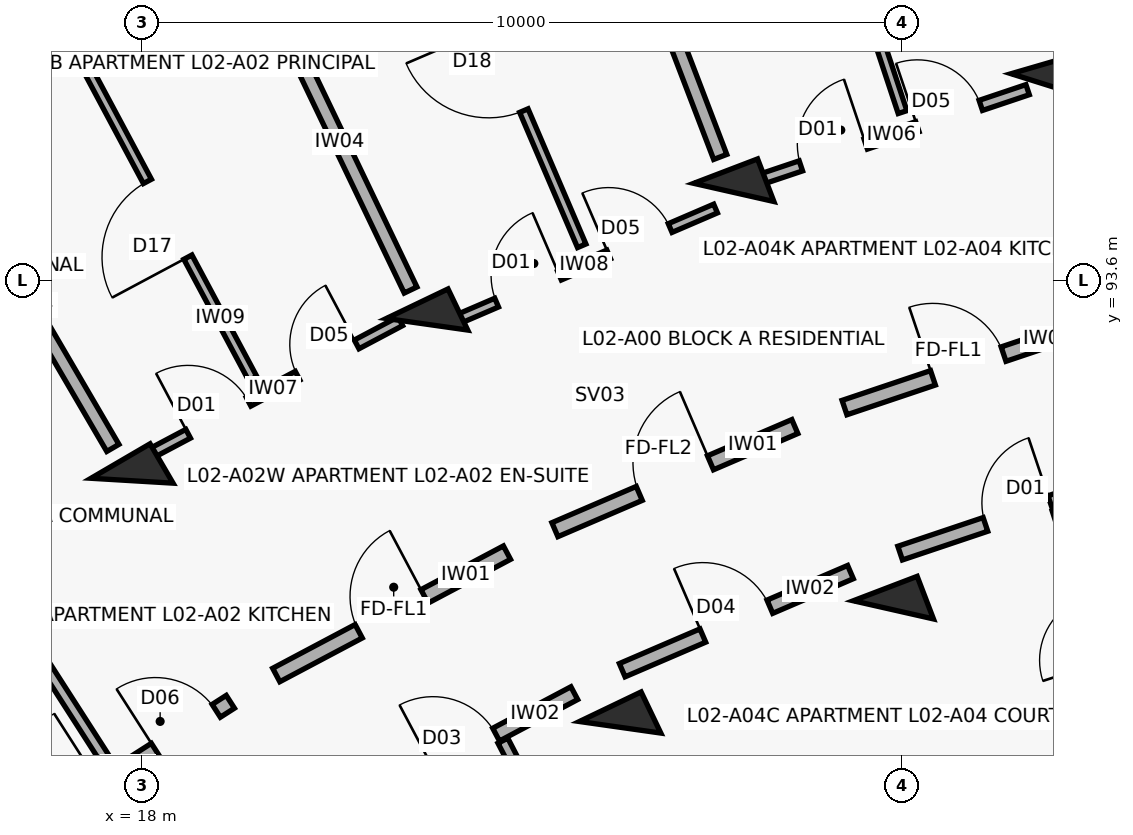
"""IFC4 building model, lengths in metres.
Left out: names, types, materials, properties, quantities, classifications, styles, units other than length and angle.
Written with IfcOpenShell. Run it as: python <this file> out.ifc"""

import sys

from ifc_helpers import new_model, si_unit, direction, frame, frame_2d, origin, origin_2d, place, context, subcontext, project, spatial, rectangle, extrude, element, fill, save


model = new_model("IFC4")
c1 = context("Model", 3, precision=1e-05, world=origin(), true_north=direction((0.0, 1.0)))
c2 = subcontext(c1, "Body", "Model", "MODEL_VIEW")
j1 = project(units=[si_unit("LENGTHUNIT", "METRE"), si_unit("PLANEANGLEUNIT", "RADIAN")], contexts=[c1])
p1 = place(None, origin())
s1 = spatial("IfcSite", under=j1, at=p1, CompositionType="ELEMENT")
p2 = place(p1, origin())
s2 = spatial("IfcBuilding", under=s1, at=p2, CompositionType="ELEMENT")
p3 = place(p2, frame((0.0, 0.0, 8.1)))
s3 = spatial("IfcBuildingStorey", under=s2, at=p3, CompositionType="ELEMENT", Elevation=8.1)
for number, where, z_axis, x_axis in (
    (1, (17.873, 90.96, 0.0), (0.0, 0.0, 1.0), (-0.504, 0.864, 0.0)),
    (2, (24.294, 87.716, 0.0), (0.0, 0.0, 1.0), (-0.432, 0.902, 0.0)),
    (3, (21.754, 93.019, 0.0), (0.0, 0.0, 1.0), (-0.432, 0.902, 0.0)),
    (4, (27.889, 89.261, 0.0), (0.0, 0.0, 1.0), (-0.357, 0.934, 0.0)),
    (5, (25.79, 94.753, 0.0), (0.0, 0.0, 1.0), (-0.357, 0.934, 0.0)),
    (6, (29.954, 96.153, 0.0), (0.0, 0.0, 1.0), (-0.28, 0.96, 0.0)),
):
    element("IfcColumn", number, at=place(p3, frame(where, z_axis=z_axis, x_axis=x_axis)), inside=s3, PredefinedType="COLUMN", context=c2, shape_type="SweptSolid", body=[
        extrude(rectangle(XDim=0.6, YDim=0.9, at=origin_2d()), origin(), (0.0, 0.0, 1.0), 3.1),
    ])
p4 = place(p3, frame((16.272, 86.199, 0.0), z_axis=(0.0, 0.0, 1.0), x_axis=(0.842257205985, 0.539075874963, 0.0)))
e7 = element("IfcWall", 7, at=p4, inside=s3, PredefinedType="SOLIDWALL", context=c2, shape_type="SweptSolid", body=[
    extrude(rectangle(XDim=3.436, YDim=0.2, at=frame_2d((1.718, 0.0))), origin(), (0.0, 0.0, 1.0), 2.08),
])
p5 = place(p4, frame((0.28, 0.0, 0.0)))
e8 = element("IfcOpeningElement", 8, at=p5, cuts=e7, PredefinedType="OPENING", context=c2, shape_type="SweptSolid", body=[
    extrude(rectangle(XDim=1.12, YDim=2.15, at=frame_2d((0.56, 1.075))), frame((0.0, 0.11, 0.0), z_axis=(0.0, -1.0, 0.0), x_axis=(1.0, 0.0, 0.0)), (0.0, 0.0, 1.0), 0.22),
])
p6 = place(p4, frame((2.266, 0.0, 0.0)))
e9 = element("IfcOpeningElement", 9, at=p6, cuts=e7, PredefinedType="OPENING", context=c2, shape_type="SweptSolid", body=[
    extrude(rectangle(XDim=0.95, YDim=2.1, at=frame_2d((0.475, 1.05))), frame((0.0, 0.11, 0.0), z_axis=(0.0, -1.0, 0.0), x_axis=(1.0, 0.0, 0.0)), (0.0, 0.0, 1.0), 0.22),
])
p7 = place(p3, frame((17.524, 87.288, 0.0), z_axis=(0.0, 0.0, 1.0), x_axis=(-0.540338452216, 0.841447774408, 0.0)))
e10 = element("IfcWall", 10, at=p7, inside=s3, PredefinedType="PARTITIONING", context=c2, shape_type="SweptSolid", body=[
    extrude(rectangle(XDim=7.95, YDim=0.14, at=frame_2d((3.975, 0.0))), origin(), (0.0, 0.0, 1.0), 2.08),
])
p8 = place(p7, frame((6.05, 0.0, 0.0)))
e11 = element("IfcOpeningElement", 11, at=p8, cuts=e10, PredefinedType="OPENING", context=c2, shape_type="SweptSolid", body=[
    extrude(rectangle(XDim=0.92, YDim=2.1, at=frame_2d((0.46, 1.05))), frame((0.0, 0.08, 0.0), z_axis=(0.0, -1.0, 0.0), x_axis=(1.0, 0.0, 0.0)), (0.0, 0.0, 1.0), 0.16),
])
p9 = place(p3, frame((19.77, 88.404, 0.0), z_axis=(0.0, 0.0, 1.0), x_axis=(0.883410853063, 0.468599258099, 0.0)))
e12 = element("IfcWall", 12, at=p9, inside=s3, PredefinedType="SOLIDWALL", context=c2, shape_type="SweptSolid", body=[
    extrude(rectangle(XDim=3.436, YDim=0.2, at=frame_2d((1.718, 0.0))), origin(), (0.0, 0.0, 1.0), 2.08),
])
p10 = place(p9, frame((1.228, 0.0, 0.0)))
e13 = element("IfcOpeningElement", 13, at=p10, cuts=e12, PredefinedType="OPENING", context=c2, shape_type="SweptSolid", body=[
    extrude(rectangle(XDim=0.98, YDim=2.15, at=frame_2d((0.49, 1.075))), frame((0.0, 0.11, 0.0), z_axis=(0.0, -1.0, 0.0), x_axis=(1.0, 0.0, 0.0)), (0.0, 0.0, 1.0), 0.22),
])
p11 = place(p3, frame((20.804, 86.634, 0.0), z_axis=(0.0, 0.0, 1.0), x_axis=(0.883444301944, 0.468536194293, 0.0)))
e14 = element("IfcWall", 14, at=p11, inside=s3, PredefinedType="SOLIDWALL", context=c2, shape_type="SweptSolid", body=[
    extrude(rectangle(XDim=3.269, YDim=0.19, at=frame_2d((1.634, 0.0))), origin(), (0.0, 0.0, 1.0), 2.08),
])
p12 = place(p11, frame((1.164, 0.0, 0.0)))
e15 = element("IfcOpeningElement", 15, at=p12, cuts=e14, PredefinedType="OPENING", context=c2, shape_type="SweptSolid", body=[
    extrude(rectangle(XDim=0.94, YDim=2.1, at=frame_2d((0.47, 1.05))), frame((0.0, 0.105, 0.0), z_axis=(0.0, -1.0, 0.0), x_axis=(1.0, 0.0, 0.0)), (0.0, 0.0, 1.0), 0.21),
])
p13 = place(p3, frame((24.267, 84.608, 0.0), z_axis=(0.0, 0.0, 1.0), x_axis=(-0.459217611894, 0.888323806349, 0.0)))
e16 = element("IfcWall", 16, at=p13, inside=s3, PredefinedType="PARTITIONING", context=c2, shape_type="SweptSolid", body=[
    extrude(rectangle(XDim=3.3, YDim=0.145, at=frame_2d((1.65, 0.0))), origin(), (0.0, 0.0, 1.0), 2.08),
])
p14 = place(p13, frame((1.21, 0.0, 0.0)))
e17 = element("IfcOpeningElement", 17, at=p14, cuts=e16, PredefinedType="OPENING", context=c2, shape_type="SweptSolid", body=[
    extrude(rectangle(XDim=0.88, YDim=2.1, at=frame_2d((0.44, 1.05))), frame((0.0, 0.083, 0.0), z_axis=(0.0, -1.0, 0.0), x_axis=(1.0, 0.0, 0.0)), (0.0, 0.0, 1.0), 0.165),
])
p15 = place(p3, frame((18.037, 91.273, 0.0), z_axis=(0.0, 0.0, 1.0), x_axis=(0.883441603894, 0.468541281543, 0.0)))
e18 = element("IfcWall", 18, at=p15, inside=s3, PredefinedType="PARTITIONING", context=c2, shape_type="SweptSolid", body=[
    extrude(rectangle(XDim=3.81, YDim=0.13, at=frame_2d((1.905, 0.0))), origin(), (0.0, 0.0, 1.0), 2.08),
])
p16 = place(p15, frame((0.65, 0.0, 0.0)))
e19 = element("IfcOpeningElement", 19, at=p16, cuts=e18, PredefinedType="OPENING", context=c2, shape_type="SweptSolid", body=[
    extrude(rectangle(XDim=0.9, YDim=2.1, at=frame_2d((0.45, 1.05))), frame((0.0, 0.075, 0.0), z_axis=(0.0, -1.0, 0.0), x_axis=(1.0, 0.0, 0.0)), (0.0, 0.0, 1.0), 0.15),
])
p17 = place(p15, frame((2.28, 0.0, 0.0)))
e20 = element("IfcOpeningElement", 20, at=p17, cuts=e18, PredefinedType="OPENING", context=c2, shape_type="SweptSolid", body=[
    extrude(rectangle(XDim=0.88, YDim=2.1, at=frame_2d((0.44, 1.05))), frame((0.0, 0.075, 0.0), z_axis=(0.0, -1.0, 0.0), x_axis=(1.0, 0.0, 0.0)), (0.0, 0.0, 1.0), 0.15),
])
p18 = place(p3, frame((19.46, 92.306, 0.0), z_axis=(0.0, 0.0, 1.0), x_axis=(-0.471228378949, 0.88201123285, 0.0)))
e21 = element("IfcWall", 21, at=p18, inside=s3, PredefinedType="PARTITIONING", context=c2, shape_type="SweptSolid", body=[
    extrude(rectangle(XDim=4.75, YDim=0.12, at=frame_2d((2.375, 0.0))), origin(), (0.0, 0.0, 1.0), 2.08),
])
p19 = place(p18, frame((1.81, 0.0, 0.0)))
e22 = element("IfcOpeningElement", 22, at=p19, cuts=e21, PredefinedType="OPENING", context=c2, shape_type="SweptSolid", body=[
    extrude(rectangle(XDim=1.13, YDim=2.1, at=frame_2d((0.565, 1.05))), frame((0.0, 0.07, 0.0), z_axis=(0.0, -1.0, 0.0), x_axis=(1.0, 0.0, 0.0)), (0.0, 0.0, 1.0), 0.14),
])
p20 = place(p3, frame((17.621, 91.392, 0.0), z_axis=(0.0, 0.0, 1.0), x_axis=(-0.504216452091, 0.863577309475, 0.0)))
e23 = element("IfcWall", 23, at=p20, inside=s3, PredefinedType="SOLIDWALL", context=c2, shape_type="SweptSolid", body=[
    extrude(rectangle(XDim=4.35, YDim=0.185, at=frame_2d((2.175, 0.0))), origin(), (0.0, 0.0, 1.0), 2.08),
])
p21 = place(p3, frame((23.437, 90.316, 0.0), z_axis=(0.0, 0.0, 1.0), x_axis=(0.918718172399, 0.394913813008, 0.0)))
e24 = element("IfcWall", 24, at=p21, inside=s3, PredefinedType="SOLIDWALL", context=c2, shape_type="SweptSolid", body=[
    extrude(rectangle(XDim=3.436, YDim=0.2, at=frame_2d((1.718, 0.0))), origin(), (0.0, 0.0, 1.0), 2.08),
])
p22 = place(p21, frame((1.208, 0.0, 0.0)))
e25 = element("IfcOpeningElement", 25, at=p22, cuts=e24, PredefinedType="OPENING", context=c2, shape_type="SweptSolid", body=[
    extrude(rectangle(XDim=1.02, YDim=2.15, at=frame_2d((0.51, 1.075))), frame((0.0, 0.11, 0.0), z_axis=(0.0, -1.0, 0.0), x_axis=(1.0, 0.0, 0.0)), (0.0, 0.0, 1.0), 0.22),
])
p23 = place(p3, frame((24.322, 88.467, 0.0), z_axis=(0.0, 0.0, 1.0), x_axis=(0.918723391052, 0.394901672235, 0.0)))
e26 = element("IfcWall", 26, at=p23, inside=s3, PredefinedType="SOLIDWALL", context=c2, shape_type="SweptSolid", body=[
    extrude(rectangle(XDim=3.269, YDim=0.19, at=frame_2d((1.634, 0.0))), origin(), (0.0, 0.0, 1.0), 2.08),
])
p24 = place(p23, frame((1.154, 0.0, 0.0)))
e27 = element("IfcOpeningElement", 27, at=p24, cuts=e26, PredefinedType="OPENING", context=c2, shape_type="SweptSolid", body=[
    extrude(rectangle(XDim=0.96, YDim=2.1, at=frame_2d((0.48, 1.05))), frame((0.0, 0.105, 0.0), z_axis=(0.0, -1.0, 0.0), x_axis=(1.0, 0.0, 0.0)), (0.0, 0.0, 1.0), 0.21),
])
p25 = place(p3, frame((22.073, 93.047, 0.0), z_axis=(0.0, 0.0, 1.0), x_axis=(0.918737522346, 0.394868794707, 0.0)))
e28 = element("IfcWall", 28, at=p25, inside=s3, PredefinedType="PARTITIONING", context=c2, shape_type="SweptSolid", body=[
    extrude(rectangle(XDim=3.785, YDim=0.125, at=frame_2d((1.893, 0.0))), origin(), (0.0, 0.0, 1.0), 2.08),
])
p26 = place(p25, frame((0.65, 0.0, 0.0)))
e29 = element("IfcOpeningElement", 29, at=p26, cuts=e28, PredefinedType="OPENING", context=c2, shape_type="SweptSolid", body=[
    extrude(rectangle(XDim=0.9, YDim=2.1, at=frame_2d((0.45, 1.05))), frame((0.0, 0.073, 0.0), z_axis=(0.0, -1.0, 0.0), x_axis=(1.0, 0.0, 0.0)), (0.0, 0.0, 1.0), 0.145),
])
p27 = place(p25, frame((2.255, 0.0, 0.0)))
e30 = element("IfcOpeningElement", 30, at=p27, cuts=e28, PredefinedType="OPENING", context=c2, shape_type="SweptSolid", body=[
    extrude(rectangle(XDim=0.88, YDim=2.1, at=frame_2d((0.44, 1.05))), frame((0.0, 0.073, 0.0), z_axis=(0.0, -1.0, 0.0), x_axis=(1.0, 0.0, 0.0)), (0.0, 0.0, 1.0), 0.145),
])
p28 = place(p3, frame((23.789, 94.051, 0.0), z_axis=(0.0, 0.0, 1.0), x_axis=(-0.393539995583, 0.919307495823, 0.0)))
e31 = element("IfcWall", 31, at=p28, inside=s3, PredefinedType="PARTITIONING", context=c2, shape_type="SweptSolid", body=[
    extrude(rectangle(XDim=5.05, YDim=0.12, at=frame_2d((2.525, 0.0))), origin(), (0.0, 0.0, 1.0), 2.08),
])
p29 = place(p28, frame((1.935, 0.0, 0.0)))
e32 = element("IfcOpeningElement", 32, at=p29, cuts=e31, PredefinedType="OPENING", context=c2, shape_type="SweptSolid", body=[
    extrude(rectangle(XDim=1.18, YDim=2.1, at=frame_2d((0.59, 1.05))), frame((0.0, 0.07, 0.0), z_axis=(0.0, -1.0, 0.0), x_axis=(1.0, 0.0, 0.0)), (0.0, 0.0, 1.0), 0.14),
])
p30 = place(p3, frame((21.538, 93.469, 0.0), z_axis=(0.0, 0.0, 1.0), x_axis=(-0.432086898897, 0.901831975371, 0.0)))
e33 = element("IfcWall", 33, at=p30, inside=s3, PredefinedType="SOLIDWALL", context=c2, shape_type="SweptSolid", body=[
    extrude(rectangle(XDim=4.35, YDim=0.185, at=frame_2d((2.175, 0.0))), origin(), (0.0, 0.0, 1.0), 2.08),
])
p31 = place(p3, frame((27.247, 91.923, 0.0), z_axis=(0.0, 0.0, 1.0), x_axis=(0.947863007629, 0.318678080151, 0.0)))
e34 = element("IfcWall", 34, at=p31, inside=s3, PredefinedType="SOLIDWALL", context=c2, shape_type="SweptSolid", body=[
    extrude(rectangle(XDim=3.436, YDim=0.2, at=frame_2d((1.718, 0.0))), origin(), (0.0, 0.0, 1.0), 2.08),
])
p32 = place(p31, frame((1.228, 0.0, 0.0)))
e35 = element("IfcOpeningElement", 35, at=p32, cuts=e34, PredefinedType="OPENING", context=c2, shape_type="SweptSolid", body=[
    extrude(rectangle(XDim=0.98, YDim=2.15, at=frame_2d((0.49, 1.075))), frame((0.0, 0.11, 0.0), z_axis=(0.0, -1.0, 0.0), x_axis=(1.0, 0.0, 0.0)), (0.0, 0.0, 1.0), 0.22),
])
p33 = place(p3, frame((27.979, 90.008, 0.0), z_axis=(0.0, 0.0, 1.0), x_axis=(0.94787351033, 0.318646839643, 0.0)))
e36 = element("IfcWall", 36, at=p33, inside=s3, PredefinedType="SOLIDWALL", context=c2, shape_type="SweptSolid", body=[
    extrude(rectangle(XDim=3.269, YDim=0.19, at=frame_2d((1.634, 0.0))), origin(), (0.0, 0.0, 1.0), 2.08),
])
p34 = place(p33, frame((1.184, 0.0, 0.0)))
e37 = element("IfcOpeningElement", 37, at=p34, cuts=e36, PredefinedType="OPENING", context=c2, shape_type="SweptSolid", body=[
    extrude(rectangle(XDim=0.9, YDim=2.1, at=frame_2d((0.45, 1.05))), frame((0.0, 0.105, 0.0), z_axis=(0.0, -1.0, 0.0), x_axis=(1.0, 0.0, 0.0)), (0.0, 0.0, 1.0), 0.21),
])
p35 = place(p3, frame((31.066, 87.446, 0.0), z_axis=(0.0, 0.0, 1.0), x_axis=(-0.308582493915, 0.951197584337, 0.0)))
e38 = element("IfcWall", 38, at=p35, inside=s3, PredefinedType="PARTITIONING", context=c2, shape_type="SweptSolid", body=[
    extrude(rectangle(XDim=3.3, YDim=0.145, at=frame_2d((1.65, 0.0))), origin(), (0.0, 0.0, 1.0), 2.08),
])
p36 = place(p35, frame((1.21, 0.0, 0.0)))
e39 = element("IfcOpeningElement", 39, at=p36, cuts=e38, PredefinedType="OPENING", context=c2, shape_type="SweptSolid", body=[
    extrude(rectangle(XDim=0.88, YDim=2.1, at=frame_2d((0.44, 1.05))), frame((0.0, 0.083, 0.0), z_axis=(0.0, -1.0, 0.0), x_axis=(1.0, 0.0, 0.0)), (0.0, 0.0, 1.0), 0.165),
])
p37 = place(p3, frame((26.056, 94.896, 0.0), z_axis=(0.0, 0.0, 1.0), x_axis=(0.947876567739, 0.318637744673, 0.0)))
e40 = element("IfcWall", 40, at=p37, inside=s3, PredefinedType="PARTITIONING", context=c2, shape_type="SweptSolid", body=[
    extrude(rectangle(XDim=3.797, YDim=0.14, at=frame_2d((1.899, 0.0))), origin(), (0.0, 0.0, 1.0), 2.08),
])
p38 = place(p37, frame((0.65, 0.0, 0.0)))
e41 = element("IfcOpeningElement", 41, at=p38, cuts=e40, PredefinedType="OPENING", context=c2, shape_type="SweptSolid", body=[
    extrude(rectangle(XDim=0.9, YDim=2.1, at=frame_2d((0.45, 1.05))), frame((0.0, 0.08, 0.0), z_axis=(0.0, -1.0, 0.0), x_axis=(1.0, 0.0, 0.0)), (0.0, 0.0, 1.0), 0.16),
])
p39 = place(p37, frame((2.267, 0.0, 0.0)))
e42 = element("IfcOpeningElement", 42, at=p39, cuts=e40, PredefinedType="OPENING", context=c2, shape_type="SweptSolid", body=[
    extrude(rectangle(XDim=0.88, YDim=2.1, at=frame_2d((0.44, 1.05))), frame((0.0, 0.08, 0.0), z_axis=(0.0, -1.0, 0.0), x_axis=(1.0, 0.0, 0.0)), (0.0, 0.0, 1.0), 0.16),
])
p40 = place(p3, frame((28.01, 95.81, 0.0), z_axis=(0.0, 0.0, 1.0), x_axis=(-0.314343770763, 0.949309219266, 0.0)))
e43 = element("IfcWall", 43, at=p40, inside=s3, PredefinedType="PARTITIONING", context=c2, shape_type="SweptSolid", body=[
    extrude(rectangle(XDim=4.9, YDim=0.12, at=frame_2d((2.45, 0.0))), origin(), (0.0, 0.0, 1.0), 2.08),
])
p41 = place(p40, frame((1.83, 0.0, 0.0)))
e44 = element("IfcOpeningElement", 44, at=p41, cuts=e43, PredefinedType="OPENING", context=c2, shape_type="SweptSolid", body=[
    extrude(rectangle(XDim=1.24, YDim=2.1, at=frame_2d((0.62, 1.05))), frame((0.0, 0.07, 0.0), z_axis=(0.0, -1.0, 0.0), x_axis=(1.0, 0.0, 0.0)), (0.0, 0.0, 1.0), 0.14),
])
p42 = place(p3, frame((25.611, 95.22, 0.0), z_axis=(0.0, 0.0, 1.0), x_axis=(-0.357064016205, 0.934079915388, 0.0)))
e45 = element("IfcWall", 45, at=p42, inside=s3, PredefinedType="SOLIDWALL", context=c2, shape_type="SweptSolid", body=[
    extrude(rectangle(XDim=4.35, YDim=0.185, at=frame_2d((2.175, 0.0))), origin(), (0.0, 0.0, 1.0), 2.08),
])
p43 = place(p6, origin())
e46 = element("IfcDoor", 46, at=p43, inside=s3, OperationType="SINGLE_SWING_LEFT", PredefinedType="DOOR", context=c2, shape_type="SweptSolid", body=[
    extrude(rectangle(XDim=0.95, YDim=2.1, at=frame_2d((0.475, 1.05))), frame((0.0, 0.025, 0.0), z_axis=(0.0, -1.0, 0.0), x_axis=(1.0, 0.0, 0.0)), (0.0, 0.0, 1.0), 0.05),
])
fill(e9, e46)
p44 = place(p10, origin())
e47 = element("IfcDoor", 47, at=p44, inside=s3, OperationType="SINGLE_SWING_RIGHT", PredefinedType="DOOR", context=c2, shape_type="SweptSolid", body=[
    extrude(rectangle(XDim=0.98, YDim=2.15, at=frame_2d((0.49, 1.075))), frame((0.0, 0.025, 0.0), z_axis=(0.0, -1.0, 0.0), x_axis=(1.0, 0.0, 0.0)), (0.0, 0.0, 1.0), 0.05),
])
fill(e13, e47)
p45 = place(p12, origin())
e48 = element("IfcDoor", 48, at=p45, inside=s3, OperationType="SINGLE_SWING_LEFT", PredefinedType="DOOR", context=c2, shape_type="SweptSolid", body=[
    extrude(rectangle(XDim=0.94, YDim=2.1, at=frame_2d((0.47, 1.05))), frame((0.0, 0.025, 0.0), z_axis=(0.0, -1.0, 0.0), x_axis=(1.0, 0.0, 0.0)), (0.0, 0.0, 1.0), 0.05),
])
fill(e15, e48)
p46 = place(p16, origin())
e49 = element("IfcDoor", 49, at=p46, inside=s3, OperationType="SINGLE_SWING_LEFT", PredefinedType="DOOR", context=c2, shape_type="SweptSolid", body=[
    extrude(rectangle(XDim=0.9, YDim=2.1, at=frame_2d((0.45, 1.05))), frame((0.0, 0.025, 0.0), z_axis=(0.0, -1.0, 0.0), x_axis=(1.0, 0.0, 0.0)), (0.0, 0.0, 1.0), 0.05),
])
fill(e19, e49)
p47 = place(p17, origin())
e50 = element("IfcDoor", 50, at=p47, inside=s3, OperationType="SINGLE_SWING_RIGHT", PredefinedType="DOOR", context=c2, shape_type="SweptSolid", body=[
    extrude(rectangle(XDim=0.88, YDim=2.1, at=frame_2d((0.44, 1.05))), frame((0.0, 0.025, 0.0), z_axis=(0.0, -1.0, 0.0), x_axis=(1.0, 0.0, 0.0)), (0.0, 0.0, 1.0), 0.05),
])
fill(e20, e50)
p48 = place(p19, origin())
e51 = element("IfcDoor", 51, at=p48, inside=s3, OperationType="SINGLE_SWING_LEFT", PredefinedType="DOOR", context=c2, shape_type="SweptSolid", body=[
    extrude(rectangle(XDim=1.13, YDim=2.1, at=frame_2d((0.565, 1.05))), frame((0.0, 0.025, 0.0), z_axis=(0.0, -1.0, 0.0), x_axis=(1.0, 0.0, 0.0)), (0.0, 0.0, 1.0), 0.05),
])
fill(e22, e51)
p49 = place(p22, origin())
e52 = element("IfcDoor", 52, at=p49, inside=s3, OperationType="SINGLE_SWING_RIGHT", PredefinedType="DOOR", context=c2, shape_type="SweptSolid", body=[
    extrude(rectangle(XDim=1.02, YDim=2.15, at=frame_2d((0.51, 1.075))), frame((0.0, 0.025, 0.0), z_axis=(0.0, -1.0, 0.0), x_axis=(1.0, 0.0, 0.0)), (0.0, 0.0, 1.0), 0.05),
])
fill(e25, e52)
p50 = place(p24, origin())
e53 = element("IfcDoor", 53, at=p50, inside=s3, OperationType="SINGLE_SWING_LEFT", PredefinedType="DOOR", context=c2, shape_type="SweptSolid", body=[
    extrude(rectangle(XDim=0.96, YDim=2.1, at=frame_2d((0.48, 1.05))), frame((0.0, 0.025, 0.0), z_axis=(0.0, -1.0, 0.0), x_axis=(1.0, 0.0, 0.0)), (0.0, 0.0, 1.0), 0.05),
])
fill(e27, e53)
p51 = place(p26, origin())
e54 = element("IfcDoor", 54, at=p51, inside=s3, OperationType="SINGLE_SWING_RIGHT", PredefinedType="DOOR", context=c2, shape_type="SweptSolid", body=[
    extrude(rectangle(XDim=0.9, YDim=2.1, at=frame_2d((0.45, 1.05))), frame((0.0, 0.025, 0.0), z_axis=(0.0, -1.0, 0.0), x_axis=(1.0, 0.0, 0.0)), (0.0, 0.0, 1.0), 0.05),
])
fill(e29, e54)
p52 = place(p27, origin())
e55 = element("IfcDoor", 55, at=p52, inside=s3, OperationType="SINGLE_SWING_LEFT", PredefinedType="DOOR", context=c2, shape_type="SweptSolid", body=[
    extrude(rectangle(XDim=0.88, YDim=2.1, at=frame_2d((0.44, 1.05))), frame((0.0, 0.025, 0.0), z_axis=(0.0, -1.0, 0.0), x_axis=(1.0, 0.0, 0.0)), (0.0, 0.0, 1.0), 0.05),
])
fill(e30, e55)
p53 = place(p29, origin())
e56 = element("IfcDoor", 56, at=p53, inside=s3, OperationType="SINGLE_SWING_RIGHT", PredefinedType="DOOR", context=c2, shape_type="SweptSolid", body=[
    extrude(rectangle(XDim=1.18, YDim=2.1, at=frame_2d((0.59, 1.05))), frame((0.0, 0.025, 0.0), z_axis=(0.0, -1.0, 0.0), x_axis=(1.0, 0.0, 0.0)), (0.0, 0.0, 1.0), 0.05),
])
fill(e32, e56)
p54 = place(p32, origin())
e57 = element("IfcDoor", 57, at=p54, inside=s3, OperationType="SINGLE_SWING_LEFT", PredefinedType="DOOR", context=c2, shape_type="SweptSolid", body=[
    extrude(rectangle(XDim=0.98, YDim=2.15, at=frame_2d((0.49, 1.075))), frame((0.0, 0.025, 0.0), z_axis=(0.0, -1.0, 0.0), x_axis=(1.0, 0.0, 0.0)), (0.0, 0.0, 1.0), 0.05),
])
fill(e35, e57)
p55 = place(p34, origin())
e58 = element("IfcDoor", 58, at=p55, inside=s3, OperationType="SINGLE_SWING_RIGHT", PredefinedType="DOOR", context=c2, shape_type="SweptSolid", body=[
    extrude(rectangle(XDim=0.9, YDim=2.1, at=frame_2d((0.45, 1.05))), frame((0.0, 0.025, 0.0), z_axis=(0.0, -1.0, 0.0), x_axis=(1.0, 0.0, 0.0)), (0.0, 0.0, 1.0), 0.05),
])
fill(e37, e58)
p56 = place(p38, origin())
e59 = element("IfcDoor", 59, at=p56, inside=s3, OperationType="SINGLE_SWING_RIGHT", PredefinedType="DOOR", context=c2, shape_type="SweptSolid", body=[
    extrude(rectangle(XDim=0.9, YDim=2.1, at=frame_2d((0.45, 1.05))), frame((0.0, 0.025, 0.0), z_axis=(0.0, -1.0, 0.0), x_axis=(1.0, 0.0, 0.0)), (0.0, 0.0, 1.0), 0.05),
])
fill(e41, e59)
p57 = place(p39, origin())
e60 = element("IfcDoor", 60, at=p57, inside=s3, OperationType="SINGLE_SWING_LEFT", PredefinedType="DOOR", context=c2, shape_type="SweptSolid", body=[
    extrude(rectangle(XDim=0.88, YDim=2.1, at=frame_2d((0.44, 1.05))), frame((0.0, 0.025, 0.0), z_axis=(0.0, -1.0, 0.0), x_axis=(1.0, 0.0, 0.0)), (0.0, 0.0, 1.0), 0.05),
])
fill(e42, e60)
save(model, sys.argv[1])
